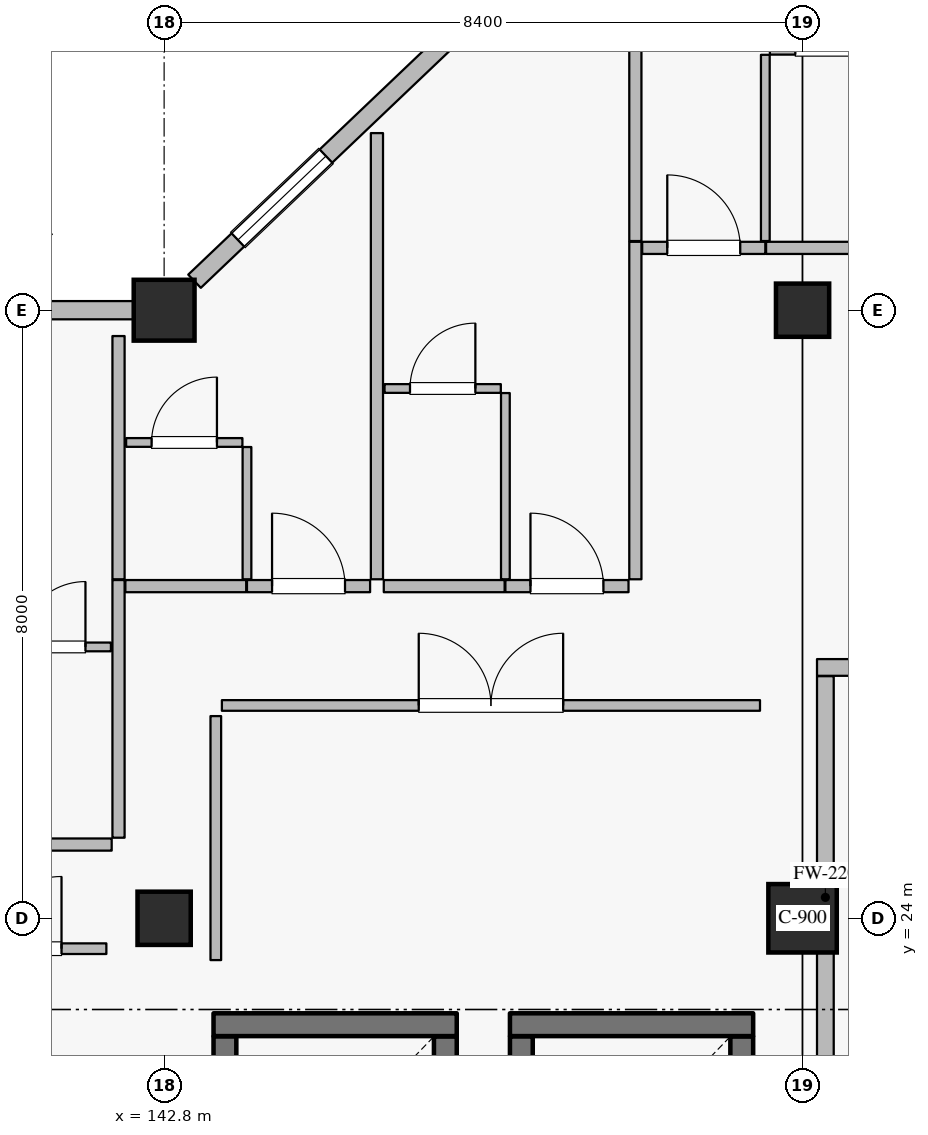
"""IFC4 building model, lengths in metres.
Left out: names, types, materials, properties, quantities, classifications, styles, units other than length and angle.
Written with IfcOpenShell. Run it as: python <this file> out.ifc"""

import sys

from ifc_helpers import new_model, si_unit, direction, frame, frame_2d, origin, origin_2d, place, context, subcontext, project, spatial, rectangle, extrude, element, fill, save


model = new_model("IFC4")
c1 = context("Model", 3, precision=1e-05, world=origin(), true_north=direction((0.0, 1.0)))
c2 = subcontext(c1, "Body", "Model", "MODEL_VIEW")
j1 = project(units=[si_unit("LENGTHUNIT", "METRE"), si_unit("PLANEANGLEUNIT", "RADIAN")], contexts=[c1])
p1 = place(None, origin())
s1 = spatial("IfcSite", under=j1, at=p1, CompositionType="ELEMENT")
p2 = place(p1, origin())
s2 = spatial("IfcBuilding", under=s1, at=p2, CompositionType="ELEMENT")
p3 = place(p2, frame((0.0, 0.0, 21.0)))
s3 = spatial("IfcBuildingStorey", under=s2, at=p3, CompositionType="ELEMENT", Elevation=21.0)
p4 = place(p3, frame((142.8, 32.0, 0.0), z_axis=(0.0, 0.0, 1.0), x_axis=(1.0, 0.0, 0.0)))
e1 = element("IfcColumn", 1, at=p4, inside=s3, PredefinedType="COLUMN", context=c2, shape_type="SweptSolid", body=[
    extrude(rectangle(XDim=0.8, YDim=0.8, at=origin_2d()), origin(), (0.0, 0.0, 1.0), 4.2),
])
p5 = place(p3, frame((151.2, 24.0, 0.0), z_axis=(0.0, 0.0, 1.0), x_axis=(1.0, 0.0, 0.0)))
e2 = element("IfcColumn", 2, at=p5, inside=s3, PredefinedType="COLUMN", context=c2, shape_type="SweptSolid", body=[
    extrude(rectangle(XDim=0.9, YDim=0.9, at=origin_2d()), origin(), (0.0, 0.0, 1.0), 4.2),
])
for number, where, z_axis, x_axis in (
    (3, (142.8, 24.0, 0.0), (0.0, 0.0, 1.0), (1.0, 0.0, 0.0)),
    (4, (151.2, 32.0, 0.0), (0.0, 0.0, 1.0), (1.0, 0.0, 0.0)),
):
    element("IfcColumn", number, at=place(p3, frame(where, z_axis=z_axis, x_axis=x_axis)), inside=s3, PredefinedType="COLUMN", context=c2, shape_type="SweptSolid", body=[
        extrude(rectangle(XDim=0.7, YDim=0.7, at=origin_2d()), origin(), (0.0, 0.0, 1.0), 4.2),
    ])
p6 = place(p3, frame((134.8, 32.0, 0.0), z_axis=(0.0, 0.0, 1.0), x_axis=(1.0, 0.0, 0.0)))
e5 = element("IfcWall", 5, at=p6, inside=s3, PredefinedType="SOLIDWALL", context=c2, shape_type="SweptSolid", body=[
    extrude(rectangle(XDim=7.6, YDim=0.24, at=frame_2d((3.8, 0.0))), origin(), (0.0, 0.0, 1.0), 3.53),
])
p7 = place(p6, frame((1.5, 0.0, 0.8)))
e6 = element("IfcOpeningElement", 6, at=p7, cuts=e5, PredefinedType="OPENING", context=c2, shape_type="SweptSolid", body=[
    extrude(rectangle(XDim=1.6, YDim=1.6, at=frame_2d((0.8, 0.8))), frame((0.0, 0.13, 0.0), z_axis=(0.0, -1.0, 0.0), x_axis=(1.0, 0.0, 0.0)), (0.0, 0.0, 1.0), 0.26),
])
p8 = place(p6, frame((4.9, 0.0, 0.8)))
e7 = element("IfcOpeningElement", 7, at=p8, cuts=e5, PredefinedType="OPENING", context=c2, shape_type="SweptSolid", body=[
    extrude(rectangle(XDim=1.6, YDim=1.6, at=frame_2d((0.8, 0.8))), frame((0.0, 0.13, 0.0), z_axis=(0.0, -1.0, 0.0), x_axis=(1.0, 0.0, 0.0)), (0.0, 0.0, 1.0), 0.26),
])
p9 = place(p3, frame((143.2, 32.381, 0.0), z_axis=(0.0, 0.0, 1.0), x_axis=(0.724156739794, 0.689635422677, 0.0)))
e8 = element("IfcWall", 8, at=p9, inside=s3, PredefinedType="SOLIDWALL", context=c2, shape_type="SweptSolid", body=[
    extrude(rectangle(XDim=10.495, YDim=0.24, at=frame_2d((5.248, 0.0))), origin(), (0.0, 0.0, 1.0), 3.53),
])
p10 = place(p9, frame((0.788, 0.0, 0.8)))
e9 = element("IfcOpeningElement", 9, at=p10, cuts=e8, PredefinedType="OPENING", context=c2, shape_type="SweptSolid", body=[
    extrude(rectangle(XDim=1.6, YDim=1.6, at=frame_2d((0.8, 0.8))), frame((0.0, 0.13, 0.0), z_axis=(0.0, -1.0, 0.0), x_axis=(1.0, 0.0, 0.0)), (0.0, 0.0, 1.0), 0.26),
])
p11 = place(p9, frame((4.862, 0.0, 0.8)))
e10 = element("IfcOpeningElement", 10, at=p11, cuts=e8, PredefinedType="OPENING", context=c2, shape_type="SweptSolid", body=[
    extrude(rectangle(XDim=1.6, YDim=1.6, at=frame_2d((0.8, 0.8))), frame((0.0, 0.13, 0.0), z_axis=(0.0, -1.0, 0.0), x_axis=(1.0, 0.0, 0.0)), (0.0, 0.0, 1.0), 0.26),
])
p12 = place(p9, frame((8.521, 0.0, 0.8)))
e11 = element("IfcOpeningElement", 11, at=p12, cuts=e8, PredefinedType="OPENING", context=c2, shape_type="SweptSolid", body=[
    extrude(rectangle(XDim=1.6, YDim=1.6, at=frame_2d((0.8, 0.8))), frame((0.0, 0.13, 0.0), z_axis=(0.0, -1.0, 0.0), x_axis=(1.0, 0.0, 0.0)), (0.0, 0.0, 1.0), 0.26),
])
p13 = place(p3, frame((146.5, 19.755, 0.0), z_axis=(0.0, 0.0, 1.0), x_axis=(0.0, 1.0, 0.0)))
e12 = element("IfcWall", 12, at=p13, inside=s3, PredefinedType="SHEAR", context=c2, shape_type="SweptSolid", body=[
    extrude(rectangle(XDim=2.69, YDim=0.3, at=frame_2d((1.345, 0.0))), origin(), (0.0, 0.0, 1.0), 3.965),
])
p14 = place(p3, frame((146.65, 22.6, 0.0), z_axis=(0.0, 0.0, 1.0), x_axis=(-1.0, 0.0, 0.0)))
e13 = element("IfcWall", 13, at=p14, inside=s3, PredefinedType="SHEAR", context=c2, shape_type="SweptSolid", body=[
    extrude(rectangle(XDim=3.2, YDim=0.3, at=frame_2d((1.6, 0.0))), origin(), (0.0, 0.0, 1.0), 3.965),
])
for number, where, z_axis, x_axis in (
    (14, (143.6, 22.445, 0.0), (0.0, 0.0, 1.0), (0.0, -1.0, 0.0)),
    (15, (150.4, 19.755, 0.0), (0.0, 0.0, 1.0), (0.0, 1.0, 0.0)),
):
    element("IfcWall", number, at=place(p3, frame(where, z_axis=z_axis, x_axis=x_axis)), inside=s3, PredefinedType="SHEAR", context=c2, shape_type="SweptSolid", body=[
        extrude(rectangle(XDim=2.69, YDim=0.3, at=frame_2d((1.345, 0.0))), origin(), (0.0, 0.0, 1.0), 3.965),
    ])
p15 = place(p3, frame((150.55, 22.6, 0.0), z_axis=(0.0, 0.0, 1.0), x_axis=(-1.0, 0.0, 0.0)))
e16 = element("IfcWall", 16, at=p15, inside=s3, PredefinedType="SHEAR", context=c2, shape_type="SweptSolid", body=[
    extrude(rectangle(XDim=3.2, YDim=0.3, at=frame_2d((1.6, 0.0))), origin(), (0.0, 0.0, 1.0), 3.965),
])
p16 = place(p3, frame((147.5, 22.445, 0.0), z_axis=(0.0, 0.0, 1.0), x_axis=(0.0, -1.0, 0.0)))
e17 = element("IfcWall", 17, at=p16, inside=s3, PredefinedType="SHEAR", context=c2, shape_type="SweptSolid", body=[
    extrude(rectangle(XDim=2.69, YDim=0.3, at=frame_2d((1.345, 0.0))), origin(), (0.0, 0.0, 1.0), 3.965),
])
p17 = place(p3, frame((151.5, 21.365, 0.0), z_axis=(0.0, 0.0, 1.0), x_axis=(0.0, 1.0, 0.0)))
e18 = element("IfcWall", 18, at=p17, inside=s3, PredefinedType="PARTITIONING", context=c2, shape_type="SweptSolid", body=[
    extrude(rectangle(XDim=5.82, YDim=0.22, at=frame_2d((2.91, 0.0))), origin(), (0.0, 0.0, 1.0), 3.965),
])
p18 = place(p3, frame((151.39, 27.3, 0.0), z_axis=(0.0, 0.0, 1.0), x_axis=(1.0, 0.0, 0.0)))
e19 = element("IfcWall", 19, at=p18, inside=s3, PredefinedType="PARTITIONING", context=c2, shape_type="SweptSolid", body=[
    extrude(rectangle(XDim=3.82, YDim=0.22, at=frame_2d((1.91, 0.0))), origin(), (0.0, 0.0, 1.0), 3.965),
])
p19 = place(p18, frame((1.35, 0.0, 0.0)))
e20 = element("IfcOpeningElement", 20, at=p19, cuts=e19, PredefinedType="OPENING", context=c2, shape_type="SweptSolid", body=[
    extrude(rectangle(XDim=1.12, YDim=2.2, at=frame_2d((0.56, 1.1))), frame((0.0, 0.12, 0.0), z_axis=(0.0, -1.0, 0.0), x_axis=(1.0, 0.0, 0.0)), (0.0, 0.0, 1.0), 0.24),
])
p20 = place(p3, frame((140.52, 24.97, 0.0), z_axis=(0.0, 0.0, 1.0), x_axis=(1.0, 0.0, 0.0)))
e21 = element("IfcWall", 21, at=p20, inside=s3, PredefinedType="PARTITIONING", context=c2, shape_type="SweptSolid", body=[
    extrude(rectangle(XDim=1.59, YDim=0.16, at=frame_2d((0.795, 0.0))), origin(), (0.0, 0.0, 1.0), 3.965),
])
p21 = place(p3, frame((140.57, 27.57, 0.0), z_axis=(0.0, 0.0, 1.0), x_axis=(1.0, 0.0, 0.0)))
e22 = element("IfcWall", 22, at=p21, inside=s3, PredefinedType="PARTITIONING", context=c2, shape_type="SweptSolid", body=[
    extrude(rectangle(XDim=1.53, YDim=0.115, at=frame_2d((0.765, 0.0))), origin(), (0.0, 0.0, 1.0), 3.965),
])
p22 = place(p21, frame((0.335, 0.0, 0.0)))
e23 = element("IfcOpeningElement", 23, at=p22, cuts=e22, PredefinedType="OPENING", context=c2, shape_type="SweptSolid", body=[
    extrude(rectangle(XDim=0.86, YDim=2.12, at=frame_2d((0.43, 1.06))), frame((0.0, 0.067, 0.0), z_axis=(0.0, -1.0, 0.0), x_axis=(1.0, 0.0, 0.0)), (0.0, 0.0, 1.0), 0.135),
])
p23 = place(p3, frame((142.2, 25.06, 0.0), z_axis=(0.0, 0.0, 1.0), x_axis=(0.0, 1.0, 0.0)))
e24 = element("IfcWall", 24, at=p23, inside=s3, PredefinedType="PARTITIONING", context=c2, shape_type="SweptSolid", body=[
    extrude(rectangle(XDim=3.39, YDim=0.16, at=frame_2d((1.695, 0.0))), origin(), (0.0, 0.0, 1.0), 3.965),
])
p24 = place(p3, frame((142.29, 28.37, 0.0), z_axis=(0.0, 0.0, 1.0), x_axis=(1.0, 0.0, 0.0)))
e25 = element("IfcWall", 25, at=p24, inside=s3, PredefinedType="PARTITIONING", context=c2, shape_type="SweptSolid", body=[
    extrude(rectangle(XDim=1.59, YDim=0.16, at=frame_2d((0.795, 0.0))), origin(), (0.0, 0.0, 1.0), 3.965),
])
p25 = place(p3, frame((143.89, 28.37, 0.0), z_axis=(0.0, 0.0, 1.0), x_axis=(1.0, 0.0, 0.0)))
e26 = element("IfcWall", 26, at=p25, inside=s3, PredefinedType="PARTITIONING", context=c2, shape_type="SweptSolid", body=[
    extrude(rectangle(XDim=1.62, YDim=0.16, at=frame_2d((0.81, 0.0))), origin(), (0.0, 0.0, 1.0), 3.965),
])
p26 = place(p25, frame((0.33, 0.0, 0.0)))
e27 = element("IfcOpeningElement", 27, at=p26, cuts=e26, PredefinedType="OPENING", context=c2, shape_type="SweptSolid", body=[
    extrude(rectangle(XDim=0.96, YDim=2.2, at=frame_2d((0.48, 1.1))), frame((0.0, 0.09, 0.0), z_axis=(0.0, -1.0, 0.0), x_axis=(1.0, 0.0, 0.0)), (0.0, 0.0, 1.0), 0.18),
])
p27 = place(p3, frame((143.89, 28.46, 0.0), z_axis=(0.0, 0.0, 1.0), x_axis=(0.0, 1.0, 0.0)))
e28 = element("IfcWall", 28, at=p27, inside=s3, PredefinedType="PARTITIONING", context=c2, shape_type="SweptSolid", body=[
    extrude(rectangle(XDim=1.74, YDim=0.115, at=frame_2d((0.87, 0.0))), origin(), (0.0, 0.0, 1.0), 3.965),
])
p28 = place(p3, frame((142.3, 30.26, 0.0), z_axis=(0.0, 0.0, 1.0), x_axis=(1.0, 0.0, 0.0)))
e29 = element("IfcWall", 29, at=p28, inside=s3, PredefinedType="PARTITIONING", context=c2, shape_type="SweptSolid", body=[
    extrude(rectangle(XDim=1.53, YDim=0.115, at=frame_2d((0.765, 0.0))), origin(), (0.0, 0.0, 1.0), 3.965),
])
p29 = place(p28, frame((0.335, 0.0, 0.0)))
e30 = element("IfcOpeningElement", 30, at=p29, cuts=e29, PredefinedType="OPENING", context=c2, shape_type="SweptSolid", body=[
    extrude(rectangle(XDim=0.86, YDim=2.12, at=frame_2d((0.43, 1.06))), frame((0.0, 0.067, 0.0), z_axis=(0.0, -1.0, 0.0), x_axis=(1.0, 0.0, 0.0)), (0.0, 0.0, 1.0), 0.135),
])
p30 = place(p3, frame((142.2, 28.46, 0.0), z_axis=(0.0, 0.0, 1.0), x_axis=(0.0, 1.0, 0.0)))
e31 = element("IfcWall", 31, at=p30, inside=s3, PredefinedType="PARTITIONING", context=c2, shape_type="SweptSolid", body=[
    extrude(rectangle(XDim=3.2, YDim=0.16, at=frame_2d((1.6, 0.0))), origin(), (0.0, 0.0, 1.0), 3.965),
])
p31 = place(p3, frame((145.69, 28.37, 0.0), z_axis=(0.0, 0.0, 1.0), x_axis=(1.0, 0.0, 0.0)))
e32 = element("IfcWall", 32, at=p31, inside=s3, PredefinedType="PARTITIONING", context=c2, shape_type="SweptSolid", body=[
    extrude(rectangle(XDim=1.59, YDim=0.16, at=frame_2d((0.795, 0.0))), origin(), (0.0, 0.0, 1.0), 3.965),
])
p32 = place(p3, frame((147.29, 28.37, 0.0), z_axis=(0.0, 0.0, 1.0), x_axis=(1.0, 0.0, 0.0)))
e33 = element("IfcWall", 33, at=p32, inside=s3, PredefinedType="PARTITIONING", context=c2, shape_type="SweptSolid", body=[
    extrude(rectangle(XDim=1.62, YDim=0.16, at=frame_2d((0.81, 0.0))), origin(), (0.0, 0.0, 1.0), 3.965),
])
p33 = place(p32, frame((0.33, 0.0, 0.0)))
e34 = element("IfcOpeningElement", 34, at=p33, cuts=e33, PredefinedType="OPENING", context=c2, shape_type="SweptSolid", body=[
    extrude(rectangle(XDim=0.96, YDim=2.2, at=frame_2d((0.48, 1.1))), frame((0.0, 0.09, 0.0), z_axis=(0.0, -1.0, 0.0), x_axis=(1.0, 0.0, 0.0)), (0.0, 0.0, 1.0), 0.18),
])
p34 = place(p3, frame((147.29, 28.46, 0.0), z_axis=(0.0, 0.0, 1.0), x_axis=(0.0, 1.0, 0.0)))
e35 = element("IfcWall", 35, at=p34, inside=s3, PredefinedType="PARTITIONING", context=c2, shape_type="SweptSolid", body=[
    extrude(rectangle(XDim=2.45, YDim=0.115, at=frame_2d((1.225, 0.0))), origin(), (0.0, 0.0, 1.0), 3.965),
])
p35 = place(p3, frame((145.7, 30.97, 0.0), z_axis=(0.0, 0.0, 1.0), x_axis=(1.0, 0.0, 0.0)))
e36 = element("IfcWall", 36, at=p35, inside=s3, PredefinedType="PARTITIONING", context=c2, shape_type="SweptSolid", body=[
    extrude(rectangle(XDim=1.53, YDim=0.115, at=frame_2d((0.765, 0.0))), origin(), (0.0, 0.0, 1.0), 3.965),
])
p36 = place(p35, frame((0.335, 0.0, 0.0)))
e37 = element("IfcOpeningElement", 37, at=p36, cuts=e36, PredefinedType="OPENING", context=c2, shape_type="SweptSolid", body=[
    extrude(rectangle(XDim=0.86, YDim=2.12, at=frame_2d((0.43, 1.06))), frame((0.0, 0.067, 0.0), z_axis=(0.0, -1.0, 0.0), x_axis=(1.0, 0.0, 0.0)), (0.0, 0.0, 1.0), 0.135),
])
p37 = place(p3, frame((145.6, 28.46, 0.0), z_axis=(0.0, 0.0, 1.0), x_axis=(0.0, 1.0, 0.0)))
e38 = element("IfcWall", 38, at=p37, inside=s3, PredefinedType="PARTITIONING", context=c2, shape_type="SweptSolid", body=[
    extrude(rectangle(XDim=5.87, YDim=0.16, at=frame_2d((2.935, 0.0))), origin(), (0.0, 0.0, 1.0), 3.965),
])
p38 = place(p3, frame((149.0, 28.46, 0.0), z_axis=(0.0, 0.0, 1.0), x_axis=(0.0, 1.0, 0.0)))
e39 = element("IfcWall", 39, at=p38, inside=s3, PredefinedType="PARTITIONING", context=c2, shape_type="SweptSolid", body=[
    extrude(rectangle(XDim=4.44, YDim=0.16, at=frame_2d((2.22, 0.0))), origin(), (0.0, 0.0, 1.0), 3.965),
])
p39 = place(p3, frame((149.09, 32.82, 0.0), z_axis=(0.0, 0.0, 1.0), x_axis=(1.0, 0.0, 0.0)))
e40 = element("IfcWall", 40, at=p39, inside=s3, PredefinedType="PARTITIONING", context=c2, shape_type="SweptSolid", body=[
    extrude(rectangle(XDim=1.62, YDim=0.16, at=frame_2d((0.81, 0.0))), origin(), (0.0, 0.0, 1.0), 3.965),
])
p40 = place(p39, frame((0.33, 0.0, 0.0)))
e41 = element("IfcOpeningElement", 41, at=p40, cuts=e40, PredefinedType="OPENING", context=c2, shape_type="SweptSolid", body=[
    extrude(rectangle(XDim=0.96, YDim=2.2, at=frame_2d((0.48, 1.1))), frame((0.0, 0.09, 0.0), z_axis=(0.0, -1.0, 0.0), x_axis=(1.0, 0.0, 0.0)), (0.0, 0.0, 1.0), 0.18),
])
p41 = place(p3, frame((150.72, 32.82, 0.0), z_axis=(0.0, 0.0, 1.0), x_axis=(1.0, 0.0, 0.0)))
e42 = element("IfcWall", 42, at=p41, inside=s3, PredefinedType="PARTITIONING", context=c2, shape_type="SweptSolid", body=[
    extrude(rectangle(XDim=1.59, YDim=0.16, at=frame_2d((0.795, 0.0))), origin(), (0.0, 0.0, 1.0), 3.965),
])
p42 = place(p3, frame((150.71, 32.91, 0.0), z_axis=(0.0, 0.0, 1.0), x_axis=(0.0, 1.0, 0.0)))
e43 = element("IfcWall", 43, at=p42, inside=s3, PredefinedType="PARTITIONING", context=c2, shape_type="SweptSolid", body=[
    extrude(rectangle(XDim=2.45, YDim=0.115, at=frame_2d((1.225, 0.0))), origin(), (0.0, 0.0, 1.0), 3.965),
])
p43 = place(p3, frame((150.77, 35.42, 0.0), z_axis=(0.0, 0.0, 1.0), x_axis=(1.0, 0.0, 0.0)))
e44 = element("IfcWall", 44, at=p43, inside=s3, PredefinedType="PARTITIONING", context=c2, shape_type="SweptSolid", body=[
    extrude(rectangle(XDim=1.53, YDim=0.115, at=frame_2d((0.765, 0.0))), origin(), (0.0, 0.0, 1.0), 3.965),
])
p44 = place(p43, frame((0.335, 0.0, 0.0)))
e45 = element("IfcOpeningElement", 45, at=p44, cuts=e44, PredefinedType="OPENING", context=c2, shape_type="SweptSolid", body=[
    extrude(rectangle(XDim=0.86, YDim=2.12, at=frame_2d((0.43, 1.06))), frame((0.0, 0.067, 0.0), z_axis=(0.0, -1.0, 0.0), x_axis=(1.0, 0.0, 0.0)), (0.0, 0.0, 1.0), 0.135),
])
p45 = place(p3, frame((149.0, 32.91, 0.0), z_axis=(0.0, 0.0, 1.0), x_axis=(0.0, 1.0, 0.0)))
e46 = element("IfcWall", 46, at=p45, inside=s3, PredefinedType="PARTITIONING", context=c2, shape_type="SweptSolid", body=[
    extrude(rectangle(XDim=4.65, YDim=0.16, at=frame_2d((2.325, 0.0))), origin(), (0.0, 0.0, 1.0), 3.965),
])
p46 = place(p3, frame((138.96, 23.6, 0.0), z_axis=(0.0, 0.0, 1.0), x_axis=(1.0, 0.0, 0.0)))
e47 = element("IfcWall", 47, at=p46, inside=s3, PredefinedType="PARTITIONING", context=c2, shape_type="SweptSolid", body=[
    extrude(rectangle(XDim=3.08, YDim=0.14, at=frame_2d((1.54, 0.0))), origin(), (0.0, 0.0, 1.0), 3.965),
])
p47 = place(p46, frame((0.59, 0.0, 0.0)))
e48 = element("IfcOpeningElement", 48, at=p47, cuts=e47, PredefinedType="OPENING", context=c2, shape_type="SweptSolid", body=[
    extrude(rectangle(XDim=1.9, YDim=2.4, at=frame_2d((0.95, 1.2))), frame((0.0, 0.08, 0.0), z_axis=(0.0, -1.0, 0.0), x_axis=(1.0, 0.0, 0.0)), (0.0, 0.0, 1.0), 0.16),
])
p48 = place(p3, frame((143.56, 26.8, 0.0), z_axis=(0.0, 0.0, 1.0), x_axis=(1.0, 0.0, 0.0)))
e49 = element("IfcWall", 49, at=p48, inside=s3, PredefinedType="PARTITIONING", context=c2, shape_type="SweptSolid", body=[
    extrude(rectangle(XDim=7.08, YDim=0.14, at=frame_2d((3.54, 0.0))), origin(), (0.0, 0.0, 1.0), 3.965),
])
p49 = place(p48, frame((2.59, 0.0, 0.0)))
e50 = element("IfcOpeningElement", 50, at=p49, cuts=e49, PredefinedType="OPENING", context=c2, shape_type="SweptSolid", body=[
    extrude(rectangle(XDim=1.9, YDim=2.4, at=frame_2d((0.95, 1.2))), frame((0.0, 0.08, 0.0), z_axis=(0.0, -1.0, 0.0), x_axis=(1.0, 0.0, 0.0)), (0.0, 0.0, 1.0), 0.16),
])
p50 = place(p3, frame((143.48, 23.45, 0.0), z_axis=(0.0, 0.0, 1.0), x_axis=(0.0, 1.0, 0.0)))
e51 = element("IfcWall", 51, at=p50, inside=s3, PredefinedType="PARTITIONING", context=c2, shape_type="SweptSolid", body=[
    extrude(rectangle(XDim=3.21, YDim=0.14, at=frame_2d((1.605, 0.0))), origin(), (0.0, 0.0, 1.0), 3.965),
])
p51 = place(p10, origin())
e52 = element("IfcWindow", 52, at=p51, inside=s3, PartitioningType="SINGLE_PANEL", PredefinedType="WINDOW", context=c2, shape_type="SweptSolid", body=[
    extrude(rectangle(XDim=1.6, YDim=1.6, at=frame_2d((0.8, 0.8))), frame((0.0, 0.03, 0.0), z_axis=(0.0, -1.0, 0.0), x_axis=(1.0, 0.0, 0.0)), (0.0, 0.0, 1.0), 0.06),
])
fill(e9, e52)
p52 = place(p22, origin())
e53 = element("IfcDoor", 53, at=p52, inside=s3, OperationType="SINGLE_SWING_RIGHT", PredefinedType="DOOR", context=c2, shape_type="SweptSolid", body=[
    extrude(rectangle(XDim=0.86, YDim=2.12, at=frame_2d((0.43, 1.06))), frame((0.0, 0.025, 0.0), z_axis=(0.0, -1.0, 0.0), x_axis=(1.0, 0.0, 0.0)), (0.0, 0.0, 1.0), 0.05),
])
fill(e23, e53)
p53 = place(p26, origin())
e54 = element("IfcDoor", 54, at=p53, inside=s3, OperationType="SINGLE_SWING_LEFT", PredefinedType="DOOR", context=c2, shape_type="SweptSolid", body=[
    extrude(rectangle(XDim=0.96, YDim=2.2, at=frame_2d((0.48, 1.1))), frame((0.0, 0.025, 0.0), z_axis=(0.0, -1.0, 0.0), x_axis=(1.0, 0.0, 0.0)), (0.0, 0.0, 1.0), 0.05),
])
fill(e27, e54)
p54 = place(p29, origin())
e55 = element("IfcDoor", 55, at=p54, inside=s3, OperationType="SINGLE_SWING_RIGHT", PredefinedType="DOOR", context=c2, shape_type="SweptSolid", body=[
    extrude(rectangle(XDim=0.86, YDim=2.12, at=frame_2d((0.43, 1.06))), frame((0.0, 0.025, 0.0), z_axis=(0.0, -1.0, 0.0), x_axis=(1.0, 0.0, 0.0)), (0.0, 0.0, 1.0), 0.05),
])
fill(e30, e55)
p55 = place(p33, origin())
e56 = element("IfcDoor", 56, at=p55, inside=s3, OperationType="SINGLE_SWING_LEFT", PredefinedType="DOOR", context=c2, shape_type="SweptSolid", body=[
    extrude(rectangle(XDim=0.96, YDim=2.2, at=frame_2d((0.48, 1.1))), frame((0.0, 0.025, 0.0), z_axis=(0.0, -1.0, 0.0), x_axis=(1.0, 0.0, 0.0)), (0.0, 0.0, 1.0), 0.05),
])
fill(e34, e56)
p56 = place(p36, origin())
e57 = element("IfcDoor", 57, at=p56, inside=s3, OperationType="SINGLE_SWING_RIGHT", PredefinedType="DOOR", context=c2, shape_type="SweptSolid", body=[
    extrude(rectangle(XDim=0.86, YDim=2.12, at=frame_2d((0.43, 1.06))), frame((0.0, 0.025, 0.0), z_axis=(0.0, -1.0, 0.0), x_axis=(1.0, 0.0, 0.0)), (0.0, 0.0, 1.0), 0.05),
])
fill(e37, e57)
p57 = place(p40, origin())
e58 = element("IfcDoor", 58, at=p57, inside=s3, OperationType="SINGLE_SWING_LEFT", PredefinedType="DOOR", context=c2, shape_type="SweptSolid", body=[
    extrude(rectangle(XDim=0.96, YDim=2.2, at=frame_2d((0.48, 1.1))), frame((0.0, 0.025, 0.0), z_axis=(0.0, -1.0, 0.0), x_axis=(1.0, 0.0, 0.0)), (0.0, 0.0, 1.0), 0.05),
])
fill(e41, e58)
p58 = place(p47, origin())
e59 = element("IfcDoor", 59, at=p58, inside=s3, OperationType="DOUBLE_DOOR_SINGLE_SWING", PredefinedType="DOOR", context=c2, shape_type="SweptSolid", body=[
    extrude(rectangle(XDim=1.9, YDim=2.4, at=frame_2d((0.95, 1.2))), frame((0.0, 0.025, 0.0), z_axis=(0.0, -1.0, 0.0), x_axis=(1.0, 0.0, 0.0)), (0.0, 0.0, 1.0), 0.05),
])
fill(e48, e59)
p59 = place(p49, origin())
e60 = element("IfcDoor", 60, at=p59, inside=s3, OperationType="DOUBLE_DOOR_SINGLE_SWING", PredefinedType="DOOR", context=c2, shape_type="SweptSolid", body=[
    extrude(rectangle(XDim=1.9, YDim=2.4, at=frame_2d((0.95, 1.2))), frame((0.0, 0.025, 0.0), z_axis=(0.0, -1.0, 0.0), x_axis=(1.0, 0.0, 0.0)), (0.0, 0.0, 1.0), 0.05),
])
fill(e50, e60)
save(model, sys.argv[1])
